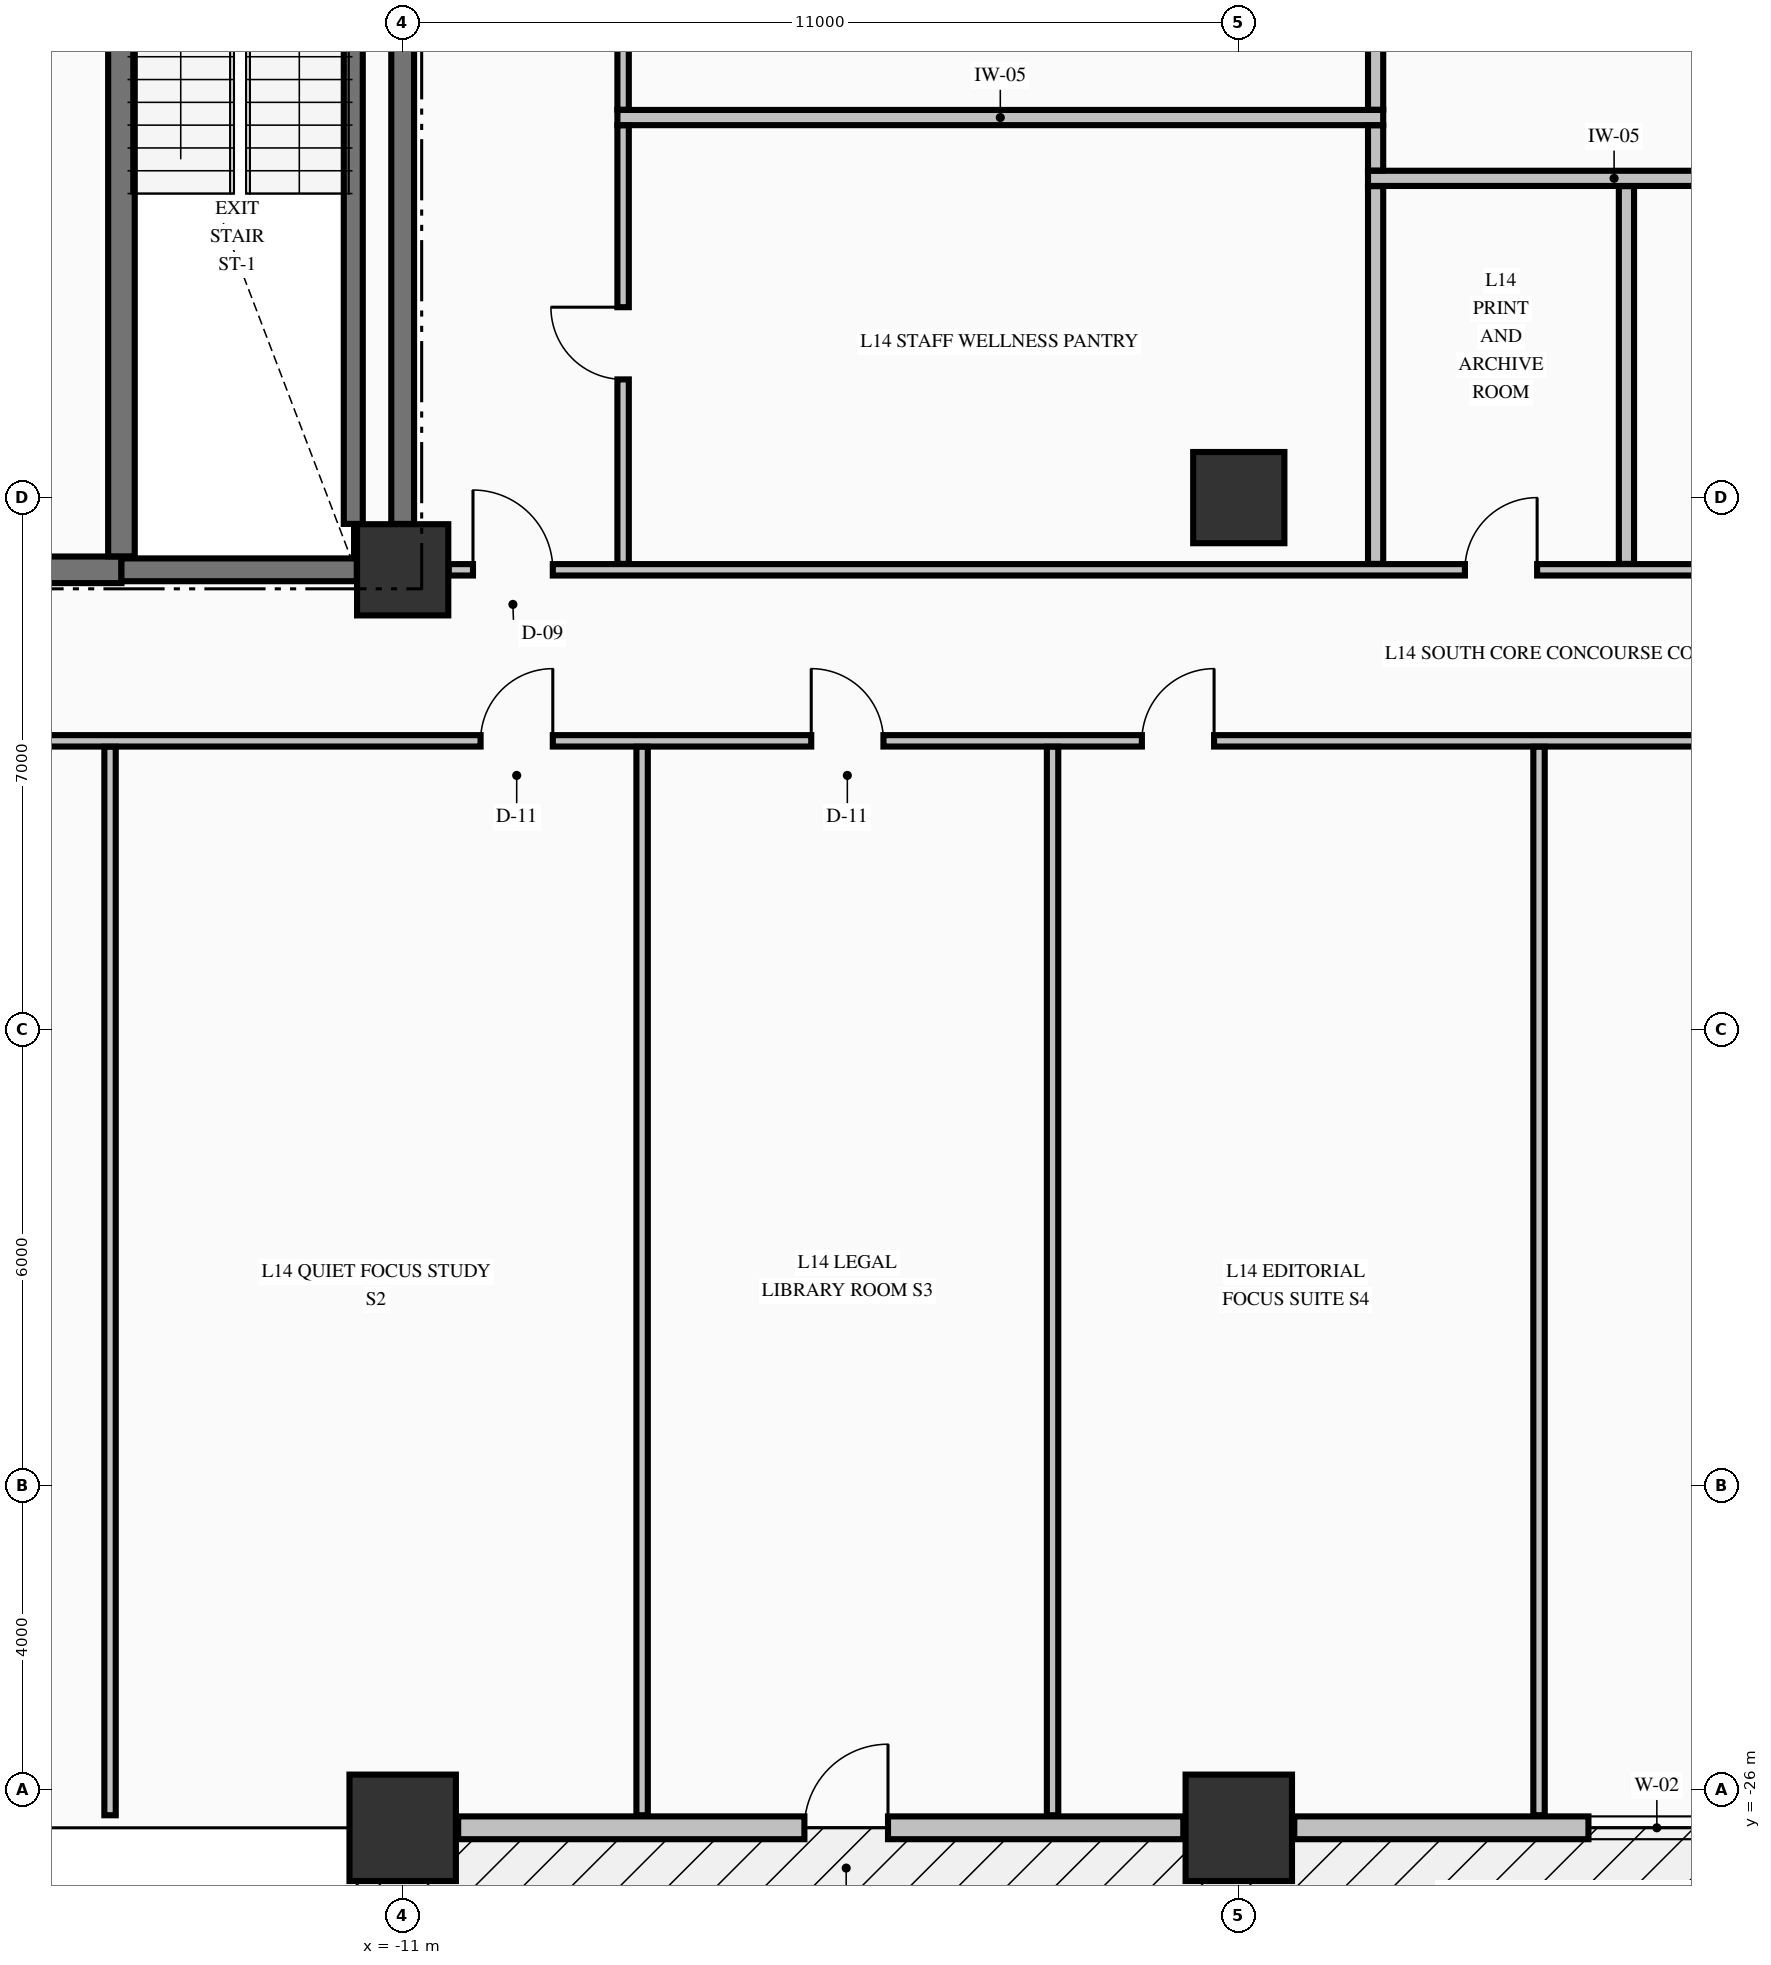
"""IFC4 building model, lengths in metres.
Left out: names, types, materials, properties, quantities, classifications, styles, units other than length and angle.
Written with IfcOpenShell. Run it as: python <this file> out.ifc"""

import sys

from ifc_helpers import new_model, si_unit, direction, frame, frame_2d, origin, origin_2d, place, context, subcontext, project, spatial, rectangle, extrude, element, fill, save


model = new_model("IFC4")
c1 = context("Model", 3, precision=1e-05, world=origin(), true_north=direction((0.0, 1.0)))
c2 = subcontext(c1, "Body", "Model", "MODEL_VIEW")
j1 = project(units=[si_unit("LENGTHUNIT", "METRE"), si_unit("PLANEANGLEUNIT", "RADIAN")], contexts=[c1])
p1 = place(None, origin())
s1 = spatial("IfcSite", under=j1, at=p1, CompositionType="ELEMENT")
p2 = place(p1, origin())
s2 = spatial("IfcBuilding", under=s1, at=p2, CompositionType="ELEMENT")
p3 = place(p2, frame((0.0, 0.0, 60.76)))
s3 = spatial("IfcBuildingStorey", under=s2, at=p3, CompositionType="ELEMENT", Elevation=60.76)
for number, where, z_axis, x_axis in (
    (1, (-11.0, -26.5, -0.3), (0.0, 0.0, 1.0), (1.0, 0.0, 0.0)),
    (2, (0.0, -26.5, -0.3), (0.0, 0.0, 1.0), (1.0, 0.0, 0.0)),
):
    element("IfcColumn", number, at=place(p3, frame(where, z_axis=z_axis, x_axis=x_axis)), inside=s3, PredefinedType="COLUMN", context=c2, shape_type="SweptSolid", body=[
        extrude(rectangle(XDim=1.4, YDim=1.4, at=origin_2d()), origin(), (0.0, 0.0, 1.0), 3.62),
    ])
for number, where, z_axis, x_axis in (
    (3, (-11.0, -9.95, -0.3), (0.0, 0.0, 1.0), (1.0, 0.0, 0.0)),
    (4, (0.0, -9.0, -0.3), (0.0, 0.0, 1.0), (1.0, 0.0, 0.0)),
):
    element("IfcColumn", number, at=place(p3, frame(where, z_axis=z_axis, x_axis=x_axis)), inside=s3, PredefinedType="COLUMN", context=c2, shape_type="SweptSolid", body=[
        extrude(rectangle(XDim=1.2, YDim=1.2, at=origin_2d()), origin(), (0.0, 0.0, 1.0), 3.62),
    ])
p4 = place(p3, frame((-10.27, -26.5, 0.0), z_axis=(0.0, 0.0, 1.0), x_axis=(1.0, 0.0, 0.0)))
e5 = element("IfcWall", 5, at=p4, inside=s3, PredefinedType="STANDARD", context=c2, shape_type="SweptSolid", body=[
    extrude(rectangle(XDim=9.54, YDim=0.3, at=frame_2d((4.77, 0.0))), origin(), (0.0, 0.0, 1.0), 2.712),
])
p5 = place(p4, frame((4.555, 0.0, 0.0)))
e6 = element("IfcOpeningElement", 6, at=p5, cuts=e5, PredefinedType="OPENING", context=c2, shape_type="SweptSolid", body=[
    extrude(rectangle(XDim=1.1, YDim=2.15, at=frame_2d((0.55, 1.075))), frame((0.0, 0.16, 0.0), z_axis=(0.0, -1.0, 0.0), x_axis=(1.0, 0.0, 0.0)), (0.0, 0.0, 1.0), 0.32),
])
p6 = place(p3, frame((0.73, -26.5, 0.0), z_axis=(0.0, 0.0, 1.0), x_axis=(1.0, 0.0, 0.0)))
e7 = element("IfcWall", 7, at=p6, inside=s3, PredefinedType="STANDARD", context=c2, shape_type="SweptSolid", body=[
    extrude(rectangle(XDim=9.54, YDim=0.3, at=frame_2d((4.77, 0.0))), origin(), (0.0, 0.0, 1.0), 2.712),
])
p7 = place(p6, frame((3.87, 0.0, 0.78)))
e8 = element("IfcOpeningElement", 8, at=p7, cuts=e7, PredefinedType="OPENING", context=c2, shape_type="SweptSolid", body=[
    extrude(rectangle(XDim=1.8, YDim=1.72, at=frame_2d((0.9, 0.86))), frame((0.0, 0.16, 0.0), z_axis=(0.0, -1.0, 0.0), x_axis=(1.0, 0.0, 0.0)), (0.0, 0.0, 1.0), 0.32),
])
p8 = place(p6, frame((6.255, 0.0, 0.78)))
e9 = element("IfcOpeningElement", 9, at=p8, cuts=e7, PredefinedType="OPENING", context=c2, shape_type="SweptSolid", body=[
    extrude(rectangle(XDim=1.8, YDim=1.72, at=frame_2d((0.9, 0.86))), frame((0.0, 0.16, 0.0), z_axis=(0.0, -1.0, 0.0), x_axis=(1.0, 0.0, 0.0)), (0.0, 0.0, 1.0), 0.32),
])
p9 = place(p3, frame((-19.396, -9.95, 0.0), z_axis=(0.0, 0.0, 1.0), x_axis=(1.0, 0.0, 0.0)))
e10 = element("IfcWall", 10, at=p9, inside=s3, PredefinedType="SHEAR", context=c2, shape_type="SweptSolid", body=[
    extrude(rectangle(XDim=4.696, YDim=0.35, at=frame_2d((2.348, 0.0))), origin(), (0.0, 0.0, 1.0), 3.32),
])
p10 = place(p9, frame((0.571, 0.0, 0.0)))
e11 = element("IfcOpeningElement", 11, at=p10, cuts=e10, PredefinedType="OPENING", context=c2, shape_type="SweptSolid", body=[
    extrude(rectangle(XDim=1.05, YDim=2.15, at=frame_2d((0.525, 1.075))), frame((0.0, 0.185, 0.0), z_axis=(0.0, -1.0, 0.0), x_axis=(1.0, 0.0, 0.0)), (0.0, 0.0, 1.0), 0.37),
])
p11 = place(p3, frame((-14.7, -9.95, 0.0), z_axis=(0.0, 0.0, 1.0), x_axis=(1.0, 0.0, 0.0)))
e12 = element("IfcWall", 12, at=p11, inside=s3, PredefinedType="SHEAR", context=c2, shape_type="SweptSolid", body=[
    extrude(rectangle(XDim=3.096, YDim=0.3, at=frame_2d((1.548, 0.0))), origin(), (0.0, 0.0, 1.0), 3.32),
])
p12 = place(p3, frame((-28.835, -12.2, 0.0), z_axis=(0.0, 0.0, 1.0), x_axis=(1.0, 0.0, 0.0)))
e13 = element("IfcWall", 13, at=p12, inside=s3, PredefinedType="PARTITIONING", context=c2, shape_type="SweptSolid", body=[
    extrude(rectangle(XDim=52.67, YDim=0.15, at=frame_2d((26.335, 0.0))), origin(), (0.0, 0.0, 1.0), 3.32),
])
p13 = place(p12, frame((10.99, 0.0, 0.0)))
e14 = element("IfcOpeningElement", 14, at=p13, cuts=e13, PredefinedType="OPENING", context=c2, shape_type="SweptSolid", body=[
    extrude(rectangle(XDim=1.05, YDim=2.15, at=frame_2d((0.525, 1.075))), frame((0.0, 0.085, 0.0), z_axis=(0.0, -1.0, 0.0), x_axis=(1.0, 0.0, 0.0)), (0.0, 0.0, 1.0), 0.17),
])
p14 = place(p12, frame((18.86, 0.0, 0.0)))
e15 = element("IfcOpeningElement", 15, at=p14, cuts=e13, PredefinedType="OPENING", context=c2, shape_type="SweptSolid", body=[
    extrude(rectangle(XDim=0.95, YDim=2.15, at=frame_2d((0.475, 1.075))), frame((0.0, 0.085, 0.0), z_axis=(0.0, -1.0, 0.0), x_axis=(1.0, 0.0, 0.0)), (0.0, 0.0, 1.0), 0.17),
])
p15 = place(p12, frame((23.21, 0.0, 0.0)))
e16 = element("IfcOpeningElement", 16, at=p15, cuts=e13, PredefinedType="OPENING", context=c2, shape_type="SweptSolid", body=[
    extrude(rectangle(XDim=0.95, YDim=2.15, at=frame_2d((0.475, 1.075))), frame((0.0, 0.085, 0.0), z_axis=(0.0, -1.0, 0.0), x_axis=(1.0, 0.0, 0.0)), (0.0, 0.0, 1.0), 0.17),
])
p16 = place(p12, frame((27.56, 0.0, 0.0)))
e17 = element("IfcOpeningElement", 17, at=p16, cuts=e13, PredefinedType="OPENING", context=c2, shape_type="SweptSolid", body=[
    extrude(rectangle(XDim=0.95, YDim=2.15, at=frame_2d((0.475, 1.075))), frame((0.0, 0.085, 0.0), z_axis=(0.0, -1.0, 0.0), x_axis=(1.0, 0.0, 0.0)), (0.0, 0.0, 1.0), 0.17),
])
p17 = place(p12, frame((36.86, 0.0, 0.0)))
e18 = element("IfcOpeningElement", 18, at=p17, cuts=e13, PredefinedType="OPENING", context=c2, shape_type="SweptSolid", body=[
    extrude(rectangle(XDim=1.05, YDim=2.15, at=frame_2d((0.525, 1.075))), frame((0.0, 0.085, 0.0), z_axis=(0.0, -1.0, 0.0), x_axis=(1.0, 0.0, 0.0)), (0.0, 0.0, 1.0), 0.17),
])
p18 = place(p12, frame((44.84, 0.0, 0.0)))
e19 = element("IfcOpeningElement", 19, at=p18, cuts=e13, PredefinedType="OPENING", context=c2, shape_type="SweptSolid", body=[
    extrude(rectangle(XDim=0.95, YDim=2.15, at=frame_2d((0.475, 1.075))), frame((0.0, 0.085, 0.0), z_axis=(0.0, -1.0, 0.0), x_axis=(1.0, 0.0, 0.0)), (0.0, 0.0, 1.0), 0.17),
])
p19 = place(p3, frame((-10.394, -9.95, 0.0), z_axis=(0.0, 0.0, 1.0), x_axis=(1.0, 0.0, 0.0)))
e20 = element("IfcWall", 20, at=p19, inside=s3, PredefinedType="PARTITIONING", context=c2, shape_type="SweptSolid", body=[
    extrude(rectangle(XDim=20.788, YDim=0.15, at=frame_2d((10.394, 0.0))), origin(), (0.0, 0.0, 1.0), 3.32),
])
p20 = place(p19, frame((0.319, 0.0, 0.0)))
e21 = element("IfcOpeningElement", 21, at=p20, cuts=e20, PredefinedType="OPENING", context=c2, shape_type="SweptSolid", body=[
    extrude(rectangle(XDim=1.05, YDim=2.15, at=frame_2d((0.525, 1.075))), frame((0.0, 0.085, 0.0), z_axis=(0.0, -1.0, 0.0), x_axis=(1.0, 0.0, 0.0)), (0.0, 0.0, 1.0), 0.17),
])
p21 = place(p19, frame((19.419, 0.0, 0.0)))
e22 = element("IfcOpeningElement", 22, at=p21, cuts=e20, PredefinedType="OPENING", context=c2, shape_type="SweptSolid", body=[
    extrude(rectangle(XDim=1.05, YDim=2.15, at=frame_2d((0.525, 1.075))), frame((0.0, 0.085, 0.0), z_axis=(0.0, -1.0, 0.0), x_axis=(1.0, 0.0, 0.0)), (0.0, 0.0, 1.0), 0.17),
])
p22 = place(p19, frame((13.369, 0.0, 0.0)))
e23 = element("IfcOpeningElement", 23, at=p22, cuts=e20, PredefinedType="OPENING", context=c2, shape_type="SweptSolid", body=[
    extrude(rectangle(XDim=0.95, YDim=2.15, at=frame_2d((0.475, 1.075))), frame((0.0, 0.085, 0.0), z_axis=(0.0, -1.0, 0.0), x_axis=(1.0, 0.0, 0.0)), (0.0, 0.0, 1.0), 0.17),
])
p23 = place(p3, frame((1.7, -4.8, 0.0), z_axis=(0.0, 0.0, 1.0), x_axis=(1.0, 0.0, 0.0)))
e24 = element("IfcWall", 24, at=p23, inside=s3, PredefinedType="PARTITIONING", context=c2, shape_type="SweptSolid", body=[
    extrude(rectangle(XDim=6.475, YDim=0.2, at=frame_2d((3.238, 0.0))), origin(), (0.0, 0.0, 1.0), 3.32),
])
p24 = place(p3, frame((-8.175, -4.0, 0.0), z_axis=(0.0, 0.0, 1.0), x_axis=(1.0, 0.0, 0.0)))
e25 = element("IfcWall", 25, at=p24, inside=s3, PredefinedType="PARTITIONING", context=c2, shape_type="SweptSolid", body=[
    extrude(rectangle(XDim=10.075, YDim=0.2, at=frame_2d((5.038, 0.0))), origin(), (0.0, 0.0, 1.0), 3.32),
])
p25 = place(p3, frame((-14.7, -9.773, 0.0), z_axis=(0.0, 0.0, 1.0), x_axis=(0.0, 1.0, 0.0)))
e26 = element("IfcWall", 26, at=p25, inside=s3, PredefinedType="SHEAR", context=c2, shape_type="SweptSolid", body=[
    extrude(rectangle(XDim=9.371, YDim=0.35, at=frame_2d((4.686, 0.0))), origin(), (0.0, 0.0, 1.0), 3.32),
])
p26 = place(p3, frame((-11.65, -9.346, 0.0), z_axis=(0.0, 0.0, 1.0), x_axis=(0.0, 1.0, 0.0)))
e27 = element("IfcWall", 27, at=p26, inside=s3, PredefinedType="SOLIDWALL", context=c2, shape_type="SweptSolid", body=[
    extrude(rectangle(XDim=8.742, YDim=0.25, at=frame_2d((4.371, 0.0))), origin(), (0.0, 0.0, 1.0), 3.32),
])
p27 = place(p3, frame((-11.0, -9.346, 0.0), z_axis=(0.0, 0.0, 1.0), x_axis=(0.0, 1.0, 0.0)))
e28 = element("IfcWall", 28, at=p27, inside=s3, PredefinedType="SHEAR", context=c2, shape_type="SweptSolid", body=[
    extrude(rectangle(XDim=8.742, YDim=0.3, at=frame_2d((4.371, 0.0))), origin(), (0.0, 0.0, 1.0), 3.32),
])
p28 = place(p3, frame((-14.85, -26.335, 0.0), z_axis=(0.0, 0.0, 1.0), x_axis=(0.0, 1.0, 0.0)))
e29 = element("IfcWall", 29, at=p28, inside=s3, PredefinedType="PARTITIONING", context=c2, shape_type="SweptSolid", body=[
    extrude(rectangle(XDim=14.057, YDim=0.15, at=frame_2d((7.028, 0.0))), origin(), (0.0, 0.0, 1.0), 3.32),
])
p29 = place(p3, frame((-8.1, -9.872, 0.0), z_axis=(0.0, 0.0, 1.0), x_axis=(0.0, 1.0, 0.0)))
e30 = element("IfcWall", 30, at=p29, inside=s3, PredefinedType="PARTITIONING", context=c2, shape_type="SweptSolid", body=[
    extrude(rectangle(XDim=5.769, YDim=0.15, at=frame_2d((2.885, 0.0))), origin(), (0.0, 0.0, 1.0), 3.32),
])
p30 = place(p29, frame((2.427, 0.0, 0.0)))
e31 = element("IfcOpeningElement", 31, at=p30, cuts=e30, PredefinedType="OPENING", context=c2, shape_type="SweptSolid", body=[
    extrude(rectangle(XDim=0.95, YDim=2.15, at=frame_2d((0.475, 1.075))), frame((0.0, 0.085, 0.0), z_axis=(0.0, -1.0, 0.0), x_axis=(1.0, 0.0, 0.0)), (0.0, 0.0, 1.0), 0.17),
])
p31 = place(p3, frame((-8.1, -3.897, 0.0), z_axis=(0.0, 0.0, 1.0), x_axis=(0.0, 1.0, 0.0)))
e32 = element("IfcWall", 32, at=p31, inside=s3, PredefinedType="PARTITIONING", context=c2, shape_type="SweptSolid", body=[
    extrude(rectangle(XDim=14.319, YDim=0.15, at=frame_2d((7.16, 0.0))), origin(), (0.0, 0.0, 1.0), 3.32),
])
p32 = place(p31, frame((6.622, 0.0, 0.0)))
e33 = element("IfcOpeningElement", 33, at=p32, cuts=e32, PredefinedType="OPENING", context=c2, shape_type="SweptSolid", body=[
    extrude(rectangle(XDim=1.05, YDim=2.15, at=frame_2d((0.525, 1.075))), frame((0.0, 0.085, 0.0), z_axis=(0.0, -1.0, 0.0), x_axis=(1.0, 0.0, 0.0)), (0.0, 0.0, 1.0), 0.17),
])
for number, where, z_axis, x_axis in (
    (34, (-7.85, -26.335, 0.0), (0.0, 0.0, 1.0), (0.0, 1.0, 0.0)),
    (35, (-2.45, -26.335, 0.0), (0.0, 0.0, 1.0), (0.0, 1.0, 0.0)),
):
    element("IfcWall", number, at=place(p3, frame(where, z_axis=z_axis, x_axis=x_axis)), inside=s3, PredefinedType="PARTITIONING", context=c2, shape_type="SweptSolid", body=[
        extrude(rectangle(XDim=14.057, YDim=0.15, at=frame_2d((7.028, 0.0))), origin(), (0.0, 0.0, 1.0), 3.32),
    ])
p33 = place(p3, frame((1.8, -9.872, 0.0), z_axis=(0.0, 0.0, 1.0), x_axis=(0.0, 1.0, 0.0)))
e36 = element("IfcWall", 36, at=p33, inside=s3, PredefinedType="PARTITIONING", context=c2, shape_type="SweptSolid", body=[
    extrude(rectangle(XDim=4.969, YDim=0.2, at=frame_2d((2.484, 0.0))), origin(), (0.0, 0.0, 1.0), 3.32),
])
p34 = place(p3, frame((1.8, -4.697, 0.0), z_axis=(0.0, 0.0, 1.0), x_axis=(0.0, 1.0, 0.0)))
e37 = element("IfcWall", 37, at=p34, inside=s3, PredefinedType="PARTITIONING", context=c2, shape_type="SweptSolid", body=[
    extrude(rectangle(XDim=0.594, YDim=0.2, at=frame_2d((0.297, 0.0))), origin(), (0.0, 0.0, 1.0), 3.32),
])
p35 = place(p3, frame((1.8, -3.897, 0.0), z_axis=(0.0, 0.0, 1.0), x_axis=(0.0, 1.0, 0.0)))
e38 = element("IfcWall", 38, at=p35, inside=s3, PredefinedType="PARTITIONING", context=c2, shape_type="SweptSolid", body=[
    extrude(rectangle(XDim=3.994, YDim=0.2, at=frame_2d((1.997, 0.0))), origin(), (0.0, 0.0, 1.0), 3.32),
])
p36 = place(p3, frame((3.95, -26.335, 0.0), z_axis=(0.0, 0.0, 1.0), x_axis=(0.0, 1.0, 0.0)))
e39 = element("IfcWall", 39, at=p36, inside=s3, PredefinedType="PARTITIONING", context=c2, shape_type="SweptSolid", body=[
    extrude(rectangle(XDim=14.057, YDim=0.15, at=frame_2d((7.028, 0.0))), origin(), (0.0, 0.0, 1.0), 3.32),
])
p37 = place(p3, frame((5.1, -9.872, 0.0), z_axis=(0.0, 0.0, 1.0), x_axis=(0.0, 1.0, 0.0)))
e40 = element("IfcWall", 40, at=p37, inside=s3, PredefinedType="PARTITIONING", context=c2, shape_type="SweptSolid", body=[
    extrude(rectangle(XDim=4.969, YDim=0.2, at=frame_2d((2.484, 0.0))), origin(), (0.0, 0.0, 1.0), 3.32),
])
p38 = place(p5, origin())
e41 = element("IfcDoor", 41, at=p38, inside=s3, OperationType="SINGLE_SWING_RIGHT", PredefinedType="DOOR", context=c2, shape_type="SweptSolid", body=[
    extrude(rectangle(XDim=1.1, YDim=2.15, at=frame_2d((0.55, 1.075))), frame((0.0, 0.025, 0.0), z_axis=(0.0, -1.0, 0.0), x_axis=(1.0, 0.0, 0.0)), (0.0, 0.0, 1.0), 0.05),
])
fill(e6, e41)
p39 = place(p7, origin())
e42 = element("IfcWindow", 42, at=p39, inside=s3, PartitioningType="SINGLE_PANEL", PredefinedType="WINDOW", context=c2, shape_type="SweptSolid", body=[
    extrude(rectangle(XDim=1.8, YDim=1.72, at=frame_2d((0.9, 0.86))), frame((0.0, 0.03, 0.0), z_axis=(0.0, -1.0, 0.0), x_axis=(1.0, 0.0, 0.0)), (0.0, 0.0, 1.0), 0.06),
])
fill(e8, e42)
p40 = place(p20, origin())
e43 = element("IfcDoor", 43, at=p40, inside=s3, OperationType="SINGLE_SWING_LEFT", PredefinedType="DOOR", context=c2, shape_type="SweptSolid", body=[
    extrude(rectangle(XDim=1.05, YDim=2.15, at=frame_2d((0.525, 1.075))), frame((0.0, 0.025, 0.0), z_axis=(0.0, -1.0, 0.0), x_axis=(1.0, 0.0, 0.0)), (0.0, 0.0, 1.0), 0.05),
])
fill(e21, e43)
p41 = place(p14, origin())
e44 = element("IfcDoor", 44, at=p41, inside=s3, OperationType="SINGLE_SWING_RIGHT", PredefinedType="DOOR", context=c2, shape_type="SweptSolid", body=[
    extrude(rectangle(XDim=0.95, YDim=2.15, at=frame_2d((0.475, 1.075))), frame((0.0, 0.025, 0.0), z_axis=(0.0, -1.0, 0.0), x_axis=(1.0, 0.0, 0.0)), (0.0, 0.0, 1.0), 0.05),
])
fill(e15, e44)
p42 = place(p15, origin())
e45 = element("IfcDoor", 45, at=p42, inside=s3, OperationType="SINGLE_SWING_LEFT", PredefinedType="DOOR", context=c2, shape_type="SweptSolid", body=[
    extrude(rectangle(XDim=0.95, YDim=2.15, at=frame_2d((0.475, 1.075))), frame((0.0, 0.025, 0.0), z_axis=(0.0, -1.0, 0.0), x_axis=(1.0, 0.0, 0.0)), (0.0, 0.0, 1.0), 0.05),
])
fill(e16, e45)
p43 = place(p16, origin())
e46 = element("IfcDoor", 46, at=p43, inside=s3, OperationType="SINGLE_SWING_RIGHT", PredefinedType="DOOR", context=c2, shape_type="SweptSolid", body=[
    extrude(rectangle(XDim=0.95, YDim=2.15, at=frame_2d((0.475, 1.075))), frame((0.0, 0.025, 0.0), z_axis=(0.0, -1.0, 0.0), x_axis=(1.0, 0.0, 0.0)), (0.0, 0.0, 1.0), 0.05),
])
fill(e17, e46)
p44 = place(p30, origin())
e47 = element("IfcDoor", 47, at=p44, inside=s3, OperationType="SINGLE_SWING_RIGHT", PredefinedType="DOOR", context=c2, shape_type="SweptSolid", body=[
    extrude(rectangle(XDim=0.95, YDim=2.15, at=frame_2d((0.475, 1.075))), frame((0.0, 0.025, 0.0), z_axis=(0.0, -1.0, 0.0), x_axis=(1.0, 0.0, 0.0)), (0.0, 0.0, 1.0), 0.05),
])
fill(e31, e47)
p45 = place(p22, origin())
e48 = element("IfcDoor", 48, at=p45, inside=s3, OperationType="SINGLE_SWING_RIGHT", PredefinedType="DOOR", context=c2, shape_type="SweptSolid", body=[
    extrude(rectangle(XDim=0.95, YDim=2.15, at=frame_2d((0.475, 1.075))), frame((0.0, 0.025, 0.0), z_axis=(0.0, -1.0, 0.0), x_axis=(1.0, 0.0, 0.0)), (0.0, 0.0, 1.0), 0.05),
])
fill(e23, e48)
save(model, sys.argv[1])
